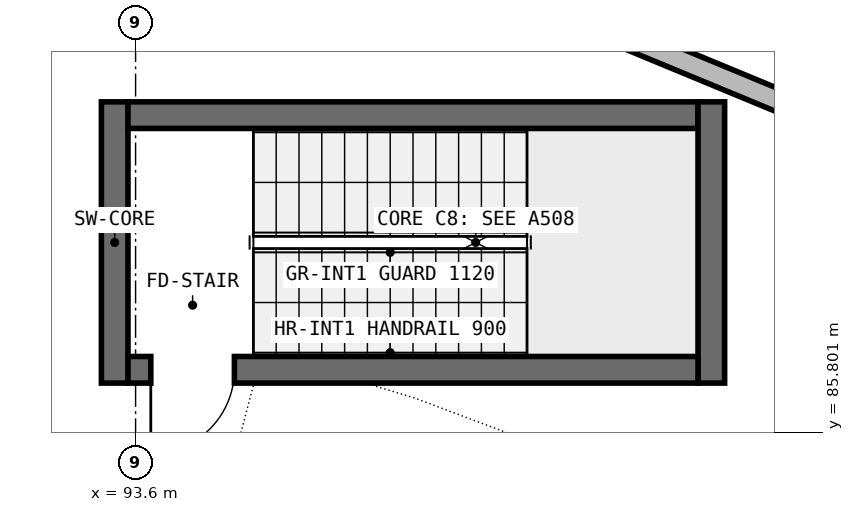
"""IFC4 building model, lengths in metres.
Left out: names, types, materials, properties, quantities, classifications, styles, units other than length and angle.
Written with IfcOpenShell. Run it as: python <this file> out.ifc"""

import sys

from ifc_helpers import new_model, si_unit, direction, frame, frame_2d, origin, place, context, subcontext, project, spatial, rectangle, extrude, element, fill, save


model = new_model("IFC4")
c1 = context("Model", 3, precision=1e-05, world=origin(), true_north=direction((0.0, 1.0)))
c2 = subcontext(c1, "Body", "Model", "MODEL_VIEW")
j1 = project(units=[si_unit("LENGTHUNIT", "METRE"), si_unit("PLANEANGLEUNIT", "RADIAN")], contexts=[c1])
p1 = place(None, origin())
s1 = spatial("IfcSite", under=j1, at=p1, CompositionType="ELEMENT")
p2 = place(p1, origin())
s2 = spatial("IfcBuilding", under=s1, at=p2, CompositionType="ELEMENT")
p3 = place(p2, frame((0.0, 0.0, 9.8)))
s3 = spatial("IfcBuildingStorey", under=s2, at=p3, CompositionType="ELEMENT", Elevation=9.8)
p4 = place(p3, frame((93.325, 86.45, 0.0), z_axis=(0.0, 0.0, 1.0), x_axis=(0.0, 1.0, 0.0)))
e1 = element("IfcWall", 1, at=p4, inside=s3, PredefinedType="SHEAR", context=c2, shape_type="SweptSolid", body=[
    extrude(rectangle(XDim=3.7, YDim=0.35, at=frame_2d((1.85, 0.0))), origin(), (0.0, 0.0, 1.0), 4.55),
])
p5 = place(p3, frame((93.5, 89.975, 0.0), z_axis=(0.0, 0.0, 1.0), x_axis=(1.0, 0.0, 0.0)))
e2 = element("IfcWall", 2, at=p5, inside=s3, PredefinedType="SHEAR", context=c2, shape_type="SweptSolid", body=[
    extrude(rectangle(XDim=7.5, YDim=0.35, at=frame_2d((3.75, 0.0))), origin(), (0.0, 0.0, 1.0), 4.55),
])
p6 = place(p3, frame((101.175, 90.15, 0.0), z_axis=(0.0, 0.0, 1.0), x_axis=(0.0, -1.0, 0.0)))
e3 = element("IfcWall", 3, at=p6, inside=s3, PredefinedType="SHEAR", context=c2, shape_type="SweptSolid", body=[
    extrude(rectangle(XDim=3.7, YDim=0.35, at=frame_2d((1.85, 0.0))), origin(), (0.0, 0.0, 1.0), 4.55),
])
p7 = place(p3, frame((101.0, 86.625, 0.0), z_axis=(0.0, 0.0, 1.0), x_axis=(-1.0, 0.0, 0.0)))
e4 = element("IfcWall", 4, at=p7, inside=s3, PredefinedType="SHEAR", context=c2, shape_type="SweptSolid", body=[
    extrude(rectangle(XDim=7.5, YDim=0.35, at=frame_2d((3.75, 0.0))), origin(), (0.0, 0.0, 1.0), 4.55),
])
p8 = place(p7, frame((6.1, 0.0, 0.0)))
e5 = element("IfcOpeningElement", 5, at=p8, cuts=e4, PredefinedType="OPENING", context=c2, shape_type="SweptSolid", body=[
    extrude(rectangle(XDim=1.1, YDim=2.15, at=frame_2d((0.55, 1.075))), frame((0.0, 0.185, 0.0), z_axis=(0.0, -1.0, 0.0), x_axis=(1.0, 0.0, 0.0)), (0.0, 0.0, 1.0), 0.37),
])
p9 = place(p3, frame((106.325, 89.483, 0.0), z_axis=(0.0, 0.0, 1.0), x_axis=(-0.92385889973, 0.382733240508, 0.0)))
e6 = element("IfcWall", 6, at=p9, inside=s3, PredefinedType="SOLIDWALL", context=c2, shape_type="SweptSolid", body=[
    extrude(rectangle(XDim=10.081, YDim=0.29, at=frame_2d((5.04, 0.0))), origin(), (0.0, 0.0, 1.0), 4.37),
])
p10 = place(p9, frame((4.295, 0.0, 0.95)))
e7 = element("IfcOpeningElement", 7, at=p10, cuts=e6, PredefinedType="OPENING", context=c2, shape_type="SweptSolid", body=[
    extrude(rectangle(XDim=1.49, YDim=1.59, at=frame_2d((0.745, 0.795))), frame((0.0, 0.155, 0.0), z_axis=(0.0, -1.0, 0.0), x_axis=(1.0, 0.0, 0.0)), (0.0, 0.0, 1.0), 0.31),
])
p11 = place(p3, frame((96.748, 92.366, 0.0), z_axis=(0.0, 0.0, 1.0), x_axis=(0.923848052238, -0.382759423628, 0.0)))
e8 = element("IfcWall", 8, at=p11, inside=s3, PredefinedType="SOLIDWALL", context=c2, shape_type="SweptSolid", body=[
    extrude(rectangle(XDim=9.821, YDim=0.29, at=frame_2d((4.91, 0.0))), origin(), (0.0, 0.0, 1.0), 4.37),
])
p12 = place(p11, frame((1.38, 0.0, 0.95)))
e9 = element("IfcOpeningElement", 9, at=p12, cuts=e8, PredefinedType="OPENING", context=c2, shape_type="SweptSolid", body=[
    extrude(rectangle(XDim=2.15, YDim=1.48, at=frame_2d((1.075, 0.74))), frame((0.0, 0.155, 0.0), z_axis=(0.0, -1.0, 0.0), x_axis=(1.0, 0.0, 0.0)), (0.0, 0.0, 1.0), 0.31),
])
p13 = place(p11, frame((6.291, 0.0, 0.95)))
e10 = element("IfcOpeningElement", 10, at=p13, cuts=e8, PredefinedType="OPENING", context=c2, shape_type="SweptSolid", body=[
    extrude(rectangle(XDim=2.15, YDim=1.48, at=frame_2d((1.075, 0.74))), frame((0.0, 0.155, 0.0), z_axis=(0.0, -1.0, 0.0), x_axis=(1.0, 0.0, 0.0)), (0.0, 0.0, 1.0), 0.31),
])
p14 = place(p8, origin())
e11 = element("IfcDoor", 11, at=p14, inside=s3, OperationType="SINGLE_SWING_RIGHT", PredefinedType="DOOR", context=c2, shape_type="SweptSolid", body=[
    extrude(rectangle(XDim=1.1, YDim=2.15, at=frame_2d((0.55, 1.075))), frame((0.0, 0.025, 0.0), z_axis=(0.0, -1.0, 0.0), x_axis=(1.0, 0.0, 0.0)), (0.0, 0.0, 1.0), 0.05),
])
fill(e5, e11)
save(model, sys.argv[1])
